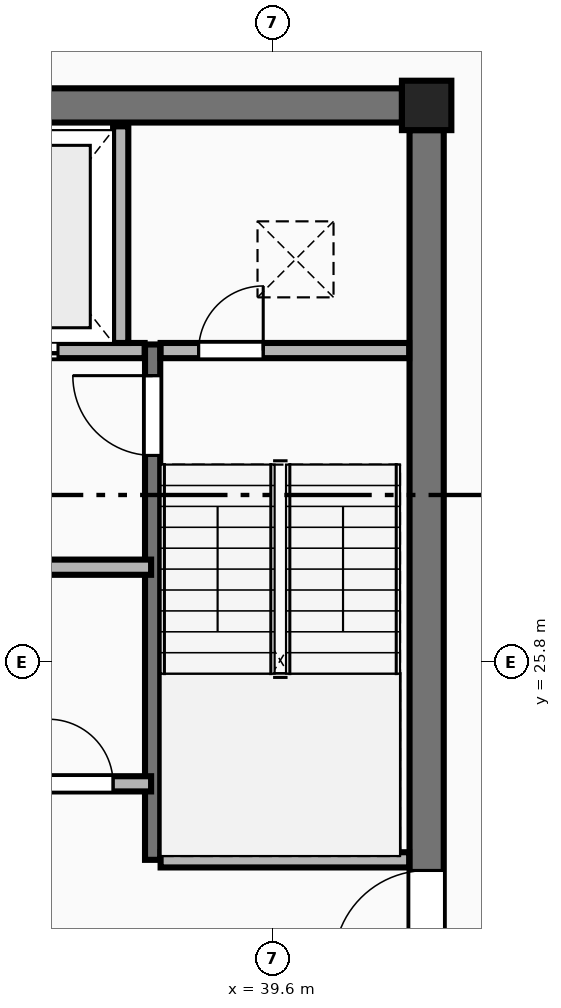
"""IFC4 building model, lengths in metres.
Left out: names, types, materials, properties, quantities, classifications, styles, units other than length and angle.
Written with IfcOpenShell. Run it as: python <this file> out.ifc"""

import sys

from ifc_helpers import new_model, si_unit, direction, frame, frame_2d, origin, origin_2d, place, context, subcontext, project, spatial, rectangle, extrude, element, fill, save


model = new_model("IFC4")
c1 = context("Model", 3, precision=1e-05, world=origin(), true_north=direction((0.0, 1.0)))
c2 = subcontext(c1, "Body", "Model", "MODEL_VIEW")
j1 = project(units=[si_unit("LENGTHUNIT", "METRE"), si_unit("PLANEANGLEUNIT", "RADIAN")], contexts=[c1])
p1 = place(None, origin())
s1 = spatial("IfcSite", under=j1, at=p1, CompositionType="ELEMENT")
p2 = place(p1, origin())
s2 = spatial("IfcBuilding", under=s1, at=p2, CompositionType="ELEMENT")
p3 = place(p2, frame((0.0, 0.0, 259.85)))
s3 = spatial("IfcBuildingStorey", under=s2, at=p3, CompositionType="ELEMENT", Elevation=259.85)
p4 = place(p3, frame((41.625, 33.125, 0.0), z_axis=(0.0, 0.0, 1.0), x_axis=(1.0, 0.0, 0.0)))
e1 = element("IfcColumn", 1, at=p4, inside=s3, PredefinedType="COLUMN", context=c2, shape_type="SweptSolid", body=[
    extrude(rectangle(XDim=0.65, YDim=0.65, at=origin_2d()), origin(), (0.0, 0.0, 1.0), 3.65),
])
p5 = place(p3, frame((23.5, 33.125, 0.0), z_axis=(0.0, 0.0, 1.0), x_axis=(1.0, 0.0, 0.0)))
e2 = element("IfcWall", 2, at=p5, inside=s3, PredefinedType="SHEAR", context=c2, shape_type="SweptSolid", body=[
    extrude(rectangle(XDim=17.8, YDim=0.45, at=frame_2d((8.9, 0.0))), origin(), (0.0, 0.0, 1.0), 3.45),
])
p6 = place(p3, frame((41.625, 19.0, 0.0), z_axis=(0.0, 0.0, 1.0), x_axis=(0.0, 1.0, 0.0)))
e3 = element("IfcWall", 3, at=p6, inside=s3, PredefinedType="SHEAR", context=c2, shape_type="SweptSolid", body=[
    extrude(rectangle(XDim=13.8, YDim=0.45, at=frame_2d((6.9, 0.0))), origin(), (0.0, 0.0, 1.0), 3.45),
])
p7 = place(p6, frame((2.84, 0.0, 0.0)))
e4 = element("IfcOpeningElement", 4, at=p7, cuts=e3, PredefinedType="OPENING", context=c2, shape_type="SweptSolid", body=[
    extrude(rectangle(XDim=1.22, YDim=2.25, at=frame_2d((0.61, 1.125))), frame((0.0, 0.235, 0.0), z_axis=(0.0, -1.0, 0.0), x_axis=(1.0, 0.0, 0.0)), (0.0, 0.0, 1.0), 0.47),
])
p8 = place(p3, frame((38.02, 23.2, 0.0), z_axis=(0.0, 0.0, 1.0), x_axis=(0.0, 1.0, 0.0)))
e5 = element("IfcWall", 5, at=p8, inside=s3, PredefinedType="SHEAR", context=c2, shape_type="SweptSolid", body=[
    extrude(rectangle(XDim=6.78, YDim=0.2, at=frame_2d((3.39, 0.0))), origin(), (0.0, 0.0, 1.0), 3.65),
])
p9 = place(p8, frame((5.32, 0.0, 0.0)))
e6 = element("IfcOpeningElement", 6, at=p9, cuts=e5, PredefinedType="OPENING", context=c2, shape_type="SweptSolid", body=[
    extrude(rectangle(XDim=1.05, YDim=2.15, at=frame_2d((0.525, 1.075))), frame((0.0, 0.11, 0.0), z_axis=(0.0, -1.0, 0.0), x_axis=(1.0, 0.0, 0.0)), (0.0, 0.0, 1.0), 0.22),
])
p10 = place(p3, frame((38.125, 23.2, 0.0), z_axis=(0.0, 0.0, 1.0), x_axis=(1.0, 0.0, 0.0)))
e7 = element("IfcWall", 7, at=p10, inside=s3, PredefinedType="PLUMBINGWALL", context=c2, shape_type="SweptSolid", body=[
    extrude(rectangle(XDim=3.27, YDim=0.2, at=frame_2d((1.635, 0.0))), origin(), (0.0, 0.0, 1.0), 3.45),
])
p11 = place(p3, frame((34.9, 29.9, 0.0), z_axis=(0.0, 0.0, 1.0), x_axis=(1.0, 0.0, 0.0)))
e8 = element("IfcWall", 8, at=p11, inside=s3, PredefinedType="PLUMBINGWALL", context=c2, shape_type="SweptSolid", body=[
    extrude(rectangle(XDim=3.015, YDim=0.2, at=frame_2d((1.508, 0.0))), origin(), (0.0, 0.0, 1.0), 3.45),
])
p12 = place(p11, frame((0.725, 0.0, 0.0)))
e9 = element("IfcOpeningElement", 9, at=p12, cuts=e8, PredefinedType="OPENING", context=c2, shape_type="SweptSolid", body=[
    extrude(rectangle(XDim=1.15, YDim=2.2, at=frame_2d((0.575, 1.1))), frame((0.0, 0.11, 0.0), z_axis=(0.0, -1.0, 0.0), x_axis=(1.0, 0.0, 0.0)), (0.0, 0.0, 1.0), 0.22),
])
p13 = place(p3, frame((38.125, 29.9, 0.0), z_axis=(0.0, 0.0, 1.0), x_axis=(1.0, 0.0, 0.0)))
e10 = element("IfcWall", 10, at=p13, inside=s3, PredefinedType="PLUMBINGWALL", context=c2, shape_type="SweptSolid", body=[
    extrude(rectangle(XDim=3.27, YDim=0.2, at=frame_2d((1.635, 0.0))), origin(), (0.0, 0.0, 1.0), 3.45),
])
p14 = place(p13, frame((0.5, 0.0, 0.0)))
e11 = element("IfcOpeningElement", 11, at=p14, cuts=e10, PredefinedType="OPENING", context=c2, shape_type="SweptSolid", body=[
    extrude(rectangle(XDim=0.85, YDim=2.05, at=frame_2d((0.425, 1.025))), frame((0.0, 0.11, 0.0), z_axis=(0.0, -1.0, 0.0), x_axis=(1.0, 0.0, 0.0)), (0.0, 0.0, 1.0), 0.22),
])
p15 = place(p3, frame((37.6, 30.0, 0.0), z_axis=(0.0, 0.0, 1.0), x_axis=(0.0, 1.0, 0.0)))
e12 = element("IfcWall", 12, at=p15, inside=s3, PredefinedType="PLUMBINGWALL", context=c2, shape_type="SweptSolid", body=[
    extrude(rectangle(XDim=2.85, YDim=0.2, at=frame_2d((1.425, 0.0))), origin(), (0.0, 0.0, 1.0), 3.45),
])
p16 = place(p3, frame((34.8, 27.05, 0.0), z_axis=(0.0, 0.0, 1.0), x_axis=(1.0, 0.0, 0.0)))
e13 = element("IfcWall", 13, at=p16, inside=s3, PredefinedType="PLUMBINGWALL", context=c2, shape_type="SweptSolid", body=[
    extrude(rectangle(XDim=3.2, YDim=0.2, at=frame_2d((1.6, 0.0))), origin(), (0.0, 0.0, 1.0), 3.45),
])
p17 = place(p3, frame((31.2, 24.2, 0.0), z_axis=(0.0, 0.0, 1.0), x_axis=(1.0, 0.0, 0.0)))
e14 = element("IfcWall", 14, at=p17, inside=s3, PredefinedType="PLUMBINGWALL", context=c2, shape_type="SweptSolid", body=[
    extrude(rectangle(XDim=6.8, YDim=0.2, at=frame_2d((3.4, 0.0))), origin(), (0.0, 0.0, 1.0), 3.45),
])
p18 = place(p17, frame((0.65, 0.0, 0.0)))
e15 = element("IfcOpeningElement", 15, at=p18, cuts=e14, PredefinedType="OPENING", context=c2, shape_type="SweptSolid", body=[
    extrude(rectangle(XDim=1.1, YDim=2.2, at=frame_2d((0.55, 1.1))), frame((0.0, 0.11, 0.0), z_axis=(0.0, -1.0, 0.0), x_axis=(1.0, 0.0, 0.0)), (0.0, 0.0, 1.0), 0.22),
])
p19 = place(p17, frame((2.55, 0.0, 0.0)))
e16 = element("IfcOpeningElement", 16, at=p19, cuts=e14, PredefinedType="OPENING", context=c2, shape_type="SweptSolid", body=[
    extrude(rectangle(XDim=0.85, YDim=2.05, at=frame_2d((0.425, 1.025))), frame((0.0, 0.11, 0.0), z_axis=(0.0, -1.0, 0.0), x_axis=(1.0, 0.0, 0.0)), (0.0, 0.0, 1.0), 0.22),
])
p20 = place(p17, frame((4.0, 0.0, 0.0)))
e17 = element("IfcOpeningElement", 17, at=p20, cuts=e14, PredefinedType="OPENING", context=c2, shape_type="SweptSolid", body=[
    extrude(rectangle(XDim=0.85, YDim=2.05, at=frame_2d((0.425, 1.025))), frame((0.0, 0.11, 0.0), z_axis=(0.0, -1.0, 0.0), x_axis=(1.0, 0.0, 0.0)), (0.0, 0.0, 1.0), 0.22),
])
p21 = place(p17, frame((5.45, 0.0, 0.0)))
e18 = element("IfcOpeningElement", 18, at=p21, cuts=e14, PredefinedType="OPENING", context=c2, shape_type="SweptSolid", body=[
    extrude(rectangle(XDim=0.85, YDim=2.05, at=frame_2d((0.425, 1.025))), frame((0.0, 0.11, 0.0), z_axis=(0.0, -1.0, 0.0), x_axis=(1.0, 0.0, 0.0)), (0.0, 0.0, 1.0), 0.22),
])
p22 = place(p7, origin())
e19 = element("IfcDoor", 19, at=p22, inside=s3, OperationType="SINGLE_SWING_LEFT", PredefinedType="DOOR", context=c2, shape_type="SweptSolid", body=[
    extrude(rectangle(XDim=1.22, YDim=2.25, at=frame_2d((0.61, 1.125))), frame((0.0, 0.025, 0.0), z_axis=(0.0, -1.0, 0.0), x_axis=(1.0, 0.0, 0.0)), (0.0, 0.0, 1.0), 0.05),
])
fill(e4, e19)
p23 = place(p9, origin())
e20 = element("IfcDoor", 20, at=p23, inside=s3, OperationType="SINGLE_SWING_RIGHT", PredefinedType="DOOR", context=c2, shape_type="SweptSolid", body=[
    extrude(rectangle(XDim=1.05, YDim=2.15, at=frame_2d((0.525, 1.075))), frame((0.0, 0.025, 0.0), z_axis=(0.0, -1.0, 0.0), x_axis=(1.0, 0.0, 0.0)), (0.0, 0.0, 1.0), 0.05),
])
fill(e6, e20)
p24 = place(p14, origin())
e21 = element("IfcDoor", 21, at=p24, inside=s3, OperationType="SINGLE_SWING_RIGHT", PredefinedType="DOOR", context=c2, shape_type="SweptSolid", body=[
    extrude(rectangle(XDim=0.85, YDim=2.05, at=frame_2d((0.425, 1.025))), frame((0.0, 0.025, 0.0), z_axis=(0.0, -1.0, 0.0), x_axis=(1.0, 0.0, 0.0)), (0.0, 0.0, 1.0), 0.05),
])
fill(e11, e21)
p25 = place(p12, origin())
e22 = element("IfcDoor", 22, at=p25, inside=s3, OperationType="DOUBLE_DOOR_SLIDING", PredefinedType="DOOR", context=c2, shape_type="SweptSolid", body=[
    extrude(rectangle(XDim=1.15, YDim=2.2, at=frame_2d((0.575, 1.1))), frame((0.0, 0.025, 0.0), z_axis=(0.0, -1.0, 0.0), x_axis=(1.0, 0.0, 0.0)), (0.0, 0.0, 1.0), 0.05),
])
fill(e9, e22)
p26 = place(p21, origin())
e23 = element("IfcDoor", 23, at=p26, inside=s3, OperationType="SINGLE_SWING_LEFT", PredefinedType="DOOR", context=c2, shape_type="SweptSolid", body=[
    extrude(rectangle(XDim=0.85, YDim=2.05, at=frame_2d((0.425, 1.025))), frame((0.0, 0.025, 0.0), z_axis=(0.0, -1.0, 0.0), x_axis=(1.0, 0.0, 0.0)), (0.0, 0.0, 1.0), 0.05),
])
fill(e18, e23)
save(model, sys.argv[1])
